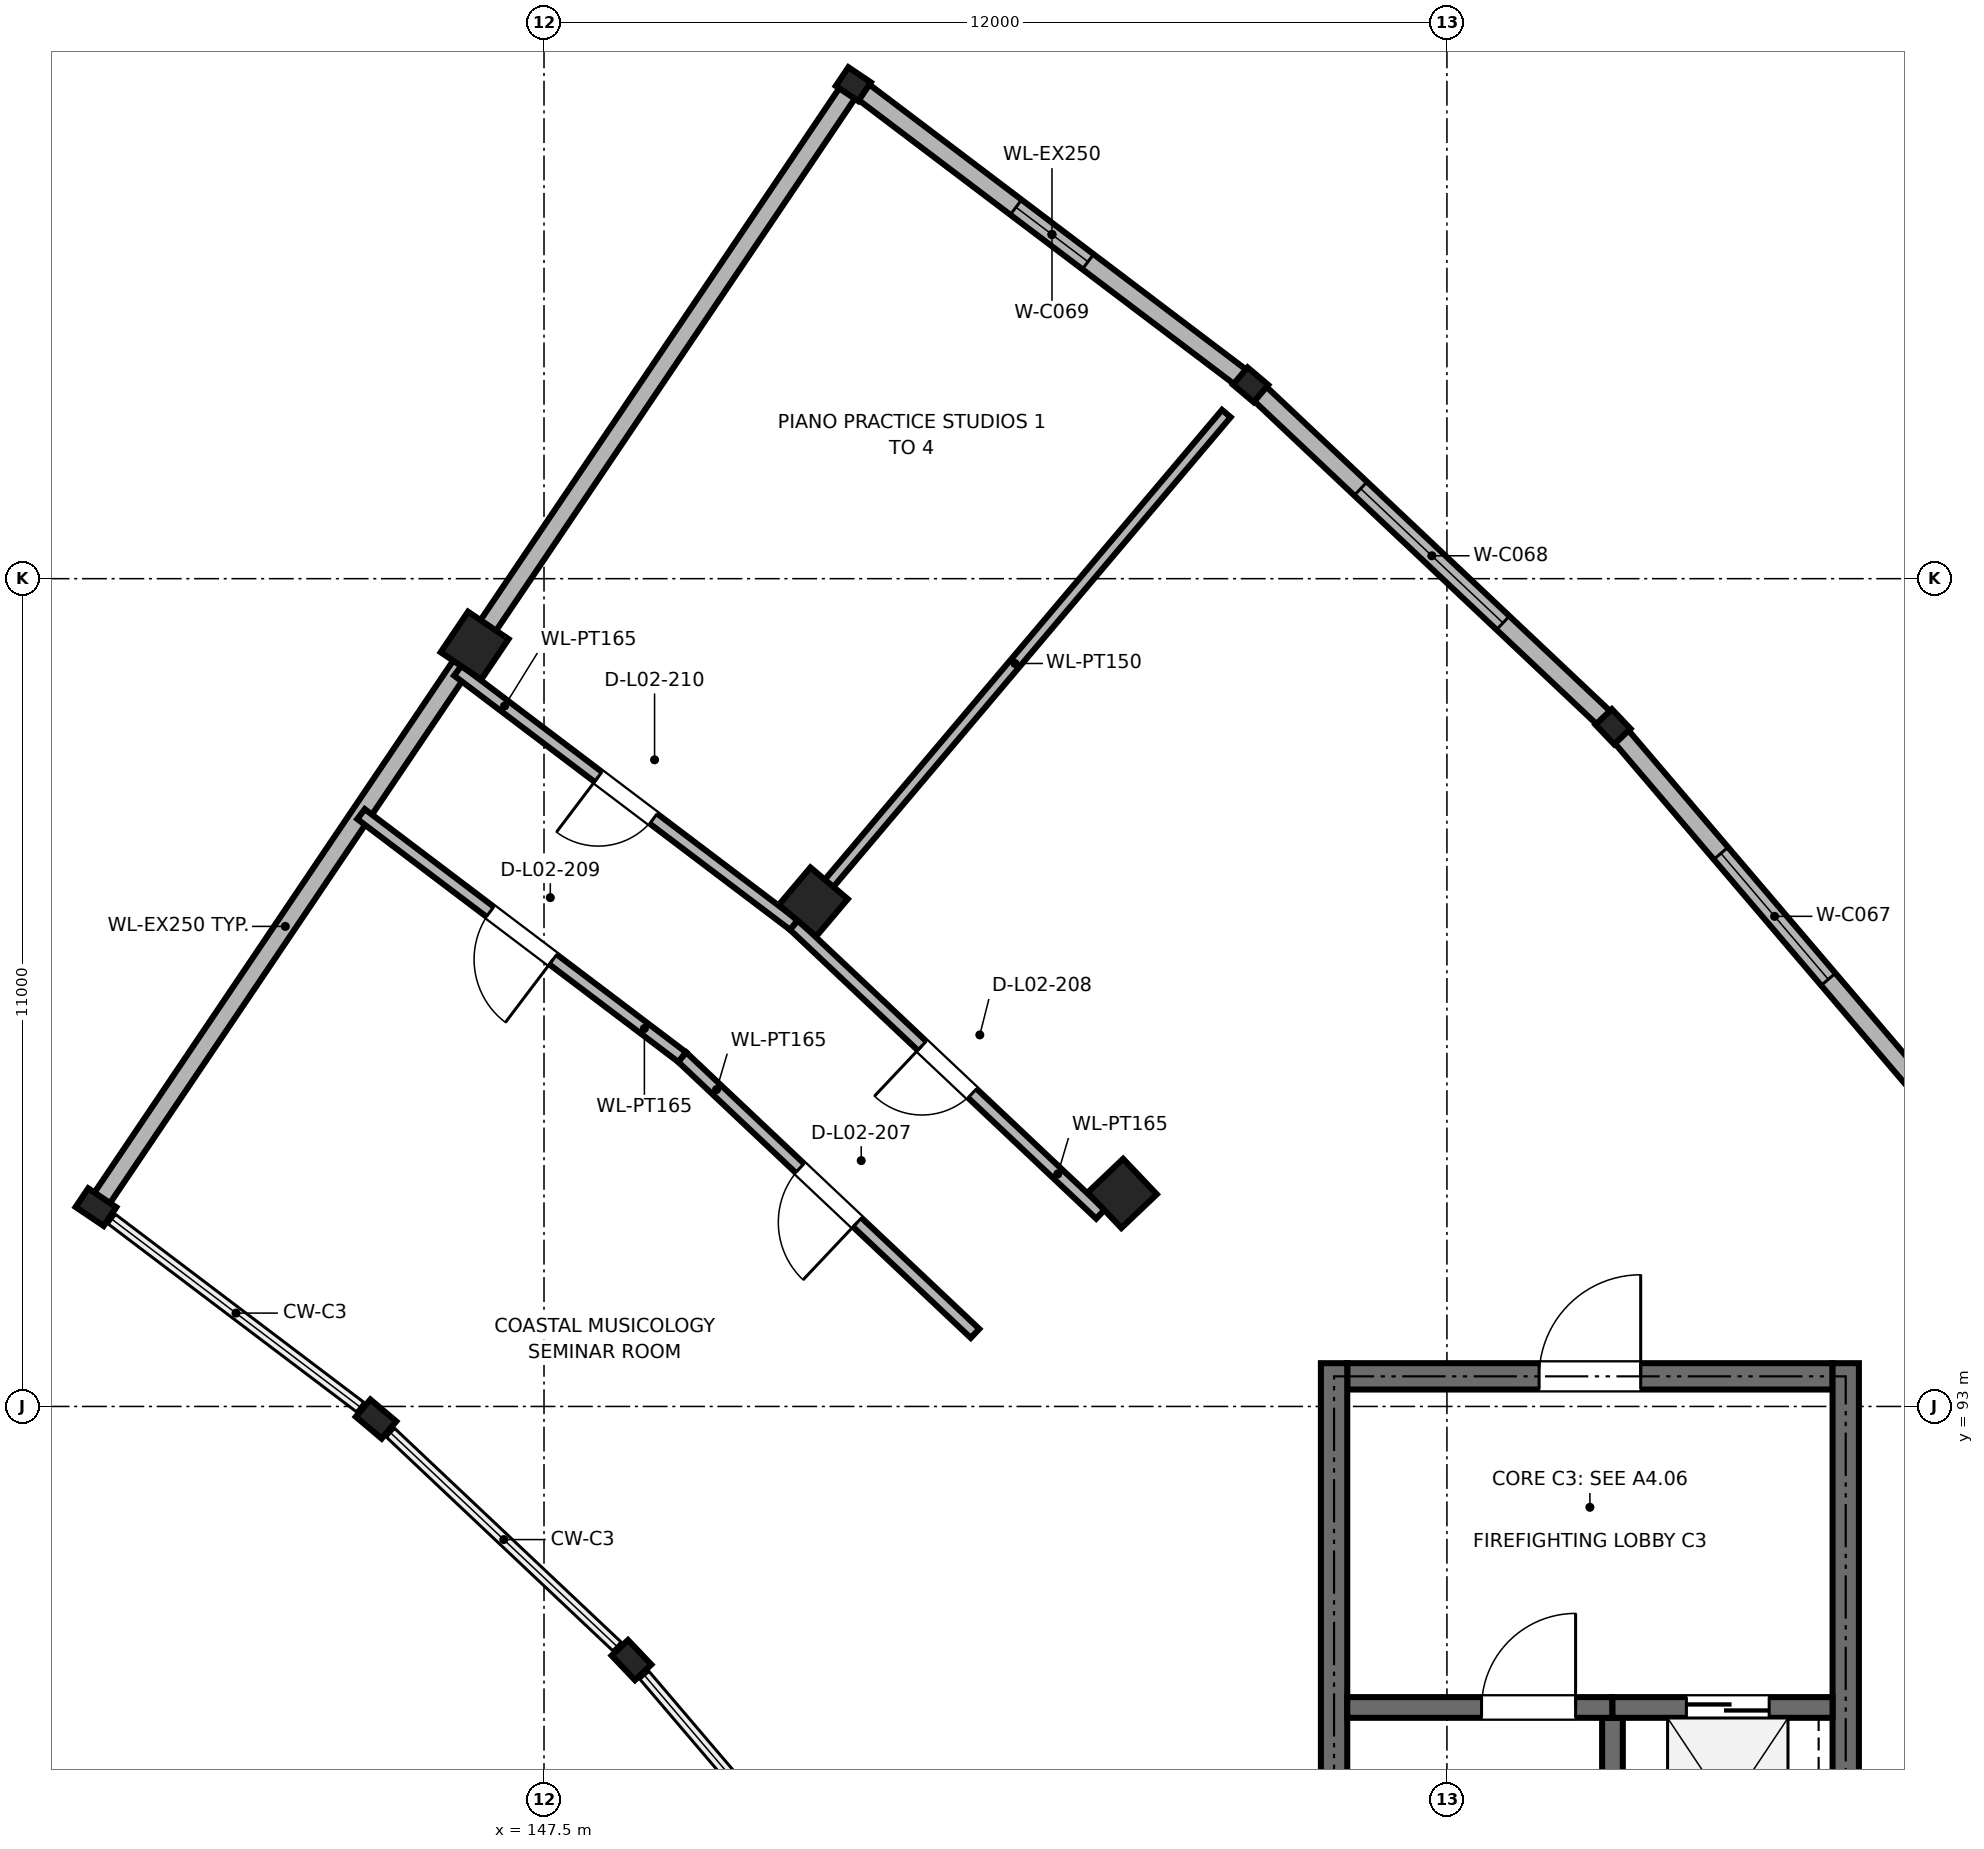
"""IFC4 building model, lengths in metres.
Left out: names, types, materials, properties, quantities, classifications, styles, units other than length and angle.
Written with IfcOpenShell. Run it as: python <this file> out.ifc"""

import sys

from ifc_helpers import new_model, si_unit, direction, frame, frame_2d, origin, origin_2d, place, context, subcontext, project, spatial, rectangle, i_section, extrude, element, fill, save


model = new_model("IFC4")
c1 = context("Model", 3, precision=1e-05, world=origin(), true_north=direction((0.0, 1.0)))
c2 = subcontext(c1, "Body", "Model", "MODEL_VIEW")
j1 = project(units=[si_unit("LENGTHUNIT", "METRE"), si_unit("PLANEANGLEUNIT", "RADIAN")], contexts=[c1])
p1 = place(None, origin())
s1 = spatial("IfcSite", under=j1, at=p1, CompositionType="ELEMENT")
p2 = place(p1, origin())
s2 = spatial("IfcBuilding", under=s1, at=p2, CompositionType="ELEMENT")
p3 = place(p2, frame((0.0, 0.0, 9.6)))
s3 = spatial("IfcBuildingStorey", under=s2, at=p3, CompositionType="ELEMENT", Elevation=9.6)
p4 = place(p3, frame((148.662, 89.629, 0.0), z_axis=(0.0, 0.0, 1.0), x_axis=(0.724653130187, 0.689113808387, 0.0)))
e1 = element("IfcColumn", 1, at=p4, inside=s3, PredefinedType="COLUMN", context=c2, shape_type="SweptSolid", body=[
    extrude(i_section(OverallWidth=0.3, OverallDepth=0.45, WebThickness=0.014, FlangeThickness=0.026, FilletRadius=0.027, at=origin_2d()), origin(), (0.0, 0.0, 1.0), 4.8),
])
p5 = place(p3, frame((155.185, 95.831, 0.0), z_axis=(0.0, 0.0, 1.0), x_axis=(0.724653130187, 0.689113808387, 0.0)))
e2 = element("IfcColumn", 2, at=p5, inside=s3, PredefinedType="COLUMN", context=c2, shape_type="SweptSolid", body=[
    extrude(rectangle(XDim=0.65, YDim=0.65, at=origin_2d()), origin(), (0.0, 0.0, 1.0), 4.8),
])
p6 = place(p3, frame((161.707, 102.032, 0.0), z_axis=(0.0, 0.0, 1.0), x_axis=(0.724653130187, 0.689113808387, 0.0)))
e3 = element("IfcColumn", 3, at=p6, inside=s3, PredefinedType="COLUMN", context=c2, shape_type="SweptSolid", body=[
    extrude(i_section(OverallWidth=0.3, OverallDepth=0.36, WebThickness=0.012, FlangeThickness=0.022, FilletRadius=0.027, at=origin_2d()), origin(), (0.0, 0.0, 1.0), 4.8),
])
p7 = place(p3, frame((145.267, 92.833, 0.0), z_axis=(0.0, 0.0, 1.0), x_axis=(0.645724263505, 0.763570674869, 0.0)))
e4 = element("IfcColumn", 4, at=p7, inside=s3, PredefinedType="COLUMN", context=c2, shape_type="SweptSolid", body=[
    extrude(i_section(OverallWidth=0.3, OverallDepth=0.45, WebThickness=0.014, FlangeThickness=0.026, FilletRadius=0.027, at=origin_2d()), origin(), (0.0, 0.0, 1.0), 4.8),
])
p8 = place(p3, frame((151.079, 99.704, 0.0), z_axis=(0.0, 0.0, 1.0), x_axis=(0.645724263505, 0.763570674869, 0.0)))
e5 = element("IfcColumn", 5, at=p8, inside=s3, PredefinedType="COLUMN", context=c2, shape_type="SweptSolid", body=[
    extrude(rectangle(XDim=0.65, YDim=0.65, at=origin_2d()), origin(), (0.0, 0.0, 1.0), 4.8),
])
p9 = place(p3, frame((156.891, 106.576, 0.0), z_axis=(0.0, 0.0, 1.0), x_axis=(0.645724263505, 0.763570674869, 0.0)))
e6 = element("IfcColumn", 6, at=p9, inside=s3, PredefinedType="COLUMN", context=c2, shape_type="SweptSolid", body=[
    extrude(i_section(OverallWidth=0.3, OverallDepth=0.36, WebThickness=0.012, FlangeThickness=0.022, FilletRadius=0.027, at=origin_2d()), origin(), (0.0, 0.0, 1.0), 4.8),
])
p10 = place(p3, frame((141.545, 95.649, 0.0), z_axis=(0.0, 0.0, 1.0), x_axis=(0.559192903471, 0.829037572555, 0.0)))
e7 = element("IfcColumn", 7, at=p10, inside=s3, PredefinedType="COLUMN", context=c2, shape_type="SweptSolid", body=[
    extrude(i_section(OverallWidth=0.3, OverallDepth=0.45, WebThickness=0.014, FlangeThickness=0.026, FilletRadius=0.027, at=origin_2d()), origin(), (0.0, 0.0, 1.0), 4.8),
])
p11 = place(p3, frame((146.578, 103.11, 0.0), z_axis=(0.0, 0.0, 1.0), x_axis=(0.559192903471, 0.829037572555, 0.0)))
e8 = element("IfcColumn", 8, at=p11, inside=s3, PredefinedType="COLUMN", context=c2, shape_type="SweptSolid", body=[
    extrude(rectangle(XDim=0.65, YDim=0.65, at=origin_2d()), origin(), (0.0, 0.0, 1.0), 4.8),
])
p12 = place(p3, frame((151.611, 110.571, 0.0), z_axis=(0.0, 0.0, 1.0), x_axis=(0.559192903471, 0.829037572555, 0.0)))
e9 = element("IfcColumn", 9, at=p12, inside=s3, PredefinedType="COLUMN", context=c2, shape_type="SweptSolid", body=[
    extrude(i_section(OverallWidth=0.3, OverallDepth=0.36, WebThickness=0.012, FlangeThickness=0.022, FilletRadius=0.027, at=origin_2d()), origin(), (0.0, 0.0, 1.0), 4.8),
])
p13 = place(p3, frame((161.72, 102.017, 0.0), z_axis=(0.0, 0.0, 1.0), x_axis=(0.648708464949, -0.761037007973, 0.0)))
e10 = element("IfcWall", 10, at=p13, inside=s3, PredefinedType="SOLIDWALL", context=c2, shape_type="SweptSolid", body=[
    extrude(rectangle(XDim=6.581, YDim=0.25, at=frame_2d((3.291, 0.0))), origin(), (0.0, 0.0, 1.0), 3.988),
])
p14 = place(p13, frame((2.191, 0.0, 1.5)))
e11 = element("IfcOpeningElement", 11, at=p14, cuts=e10, PredefinedType="OPENING", context=c2, shape_type="SweptSolid", body=[
    extrude(rectangle(XDim=2.2, YDim=1.05, at=frame_2d((1.1, 0.525))), frame((0.0, 0.135, 0.0), z_axis=(0.0, -1.0, 0.0), x_axis=(1.0, 0.0, 0.0)), (0.0, 0.0, 1.0), 0.27),
])
p15 = place(p3, frame((156.906, 106.562, 0.0), z_axis=(0.0, 0.0, 1.0), x_axis=(0.727377231984, -0.686237832235, 0.0)))
e12 = element("IfcWall", 12, at=p15, inside=s3, PredefinedType="SOLIDWALL", context=c2, shape_type="SweptSolid", body=[
    extrude(rectangle(XDim=6.581, YDim=0.25, at=frame_2d((3.291, 0.0))), origin(), (0.0, 0.0, 1.0), 3.988),
])
p16 = place(p15, frame((1.991, 0.0, 1.5)))
e13 = element("IfcOpeningElement", 13, at=p16, cuts=e12, PredefinedType="OPENING", context=c2, shape_type="SweptSolid", body=[
    extrude(rectangle(XDim=2.6, YDim=1.05, at=frame_2d((1.3, 0.525))), frame((0.0, 0.135, 0.0), z_axis=(0.0, -1.0, 0.0), x_axis=(1.0, 0.0, 0.0)), (0.0, 0.0, 1.0), 0.27),
])
p17 = place(p3, frame((151.627, 110.559, 0.0), z_axis=(0.0, 0.0, 1.0), x_axis=(0.797477783019, -0.603348311998, 0.0)))
e14 = element("IfcWall", 14, at=p17, inside=s3, PredefinedType="SOLIDWALL", context=c2, shape_type="SweptSolid", body=[
    extrude(rectangle(XDim=6.581, YDim=0.25, at=frame_2d((3.291, 0.0))), origin(), (0.0, 0.0, 1.0), 3.988),
])
p18 = place(p17, frame((2.691, 0.0, 0.9)))
e15 = element("IfcOpeningElement", 15, at=p18, cuts=e14, PredefinedType="OPENING", context=c2, shape_type="SweptSolid", body=[
    extrude(rectangle(XDim=1.2, YDim=1.55, at=frame_2d((0.6, 0.775))), frame((0.0, 0.135, 0.0), z_axis=(0.0, -1.0, 0.0), x_axis=(1.0, 0.0, 0.0)), (0.0, 0.0, 1.0), 0.27),
])
p19 = place(p3, frame((141.556, 95.665, 0.0), z_axis=(0.0, 0.0, 1.0), x_axis=(0.559200466777, 0.829032470991, 0.0)))
e16 = element("IfcWall", 16, at=p19, inside=s3, PredefinedType="SOLIDWALL", context=c2, shape_type="SweptSolid", body=[
    extrude(rectangle(XDim=8.96, YDim=0.25, at=frame_2d((4.48, 0.0))), origin(), (0.0, 0.0, 1.0), 3.988),
])
p20 = place(p3, frame((146.589, 103.127, 0.0), z_axis=(0.0, 0.0, 1.0), x_axis=(0.559213098812, 0.829023950268, 0.0)))
e17 = element("IfcWall", 17, at=p20, inside=s3, PredefinedType="SOLIDWALL", context=c2, shape_type="SweptSolid", body=[
    extrude(rectangle(XDim=8.96, YDim=0.25, at=frame_2d((4.48, 0.0))), origin(), (0.0, 0.0, 1.0), 3.988),
])
p21 = place(p3, frame((158.175, 93.4, 0.0), z_axis=(0.0, 0.0, 1.0), x_axis=(1.0, 0.0, 0.0)))
e18 = element("IfcWall", 18, at=p21, inside=s3, PredefinedType="SHEAR", context=c2, shape_type="SweptSolid", body=[
    extrude(rectangle(XDim=6.45, YDim=0.35, at=frame_2d((3.225, 0.0))), origin(), (0.0, 0.0, 1.0), 4.55),
])
p22 = place(p21, frame((2.55, 0.0, 0.0)))
e19 = element("IfcOpeningElement", 19, at=p22, cuts=e18, PredefinedType="OPENING", context=c2, shape_type="SweptSolid", body=[
    extrude(rectangle(XDim=1.35, YDim=2.2, at=frame_2d((0.675, 1.1))), frame((0.0, 0.185, 0.0), z_axis=(0.0, -1.0, 0.0), x_axis=(1.0, 0.0, 0.0)), (0.0, 0.0, 1.0), 0.37),
])
for number, where, z_axis, x_axis in (
    (20, (158.0, 81.975, 0.0), (0.0, 0.0, 1.0), (0.0, 1.0, 0.0)),
    (21, (164.8, 81.975, 0.0), (0.0, 0.0, 1.0), (0.0, 1.0, 0.0)),
):
    element("IfcWall", number, at=place(p3, frame(where, z_axis=z_axis, x_axis=x_axis)), inside=s3, PredefinedType="SHEAR", context=c2, shape_type="SweptSolid", body=[
        extrude(rectangle(XDim=11.6, YDim=0.35, at=frame_2d((5.8, 0.0))), origin(), (0.0, 0.0, 1.0), 4.55),
    ])
p23 = place(p3, frame((161.7, 81.975, 0.0), z_axis=(0.0, 0.0, 1.0), x_axis=(0.0, 1.0, 0.0)))
e22 = element("IfcWall", 22, at=p23, inside=s3, PredefinedType="SHEAR", context=c2, shape_type="SweptSolid", body=[
    extrude(rectangle(XDim=6.887, YDim=0.275, at=frame_2d((3.444, 0.0))), origin(), (0.0, 0.0, 1.0), 4.55),
])
p24 = place(p3, frame((158.175, 89.0, 0.0), z_axis=(0.0, 0.0, 1.0), x_axis=(1.0, 0.0, 0.0)))
e23 = element("IfcWall", 23, at=p24, inside=s3, PredefinedType="SHEAR", context=c2, shape_type="SweptSolid", body=[
    extrude(rectangle(XDim=3.525, YDim=0.275, at=frame_2d((1.762, 0.0))), origin(), (0.0, 0.0, 1.0), 4.55),
])
p25 = place(p24, frame((1.785, 0.0, 0.0)))
e24 = element("IfcOpeningElement", 24, at=p25, cuts=e23, PredefinedType="OPENING", context=c2, shape_type="SweptSolid", body=[
    extrude(rectangle(XDim=1.25, YDim=2.15, at=frame_2d((0.625, 1.075))), frame((0.0, 0.147, 0.0), z_axis=(0.0, -1.0, 0.0), x_axis=(1.0, 0.0, 0.0)), (0.0, 0.0, 1.0), 0.295),
])
p26 = place(p3, frame((161.7, 89.0, 0.0), z_axis=(0.0, 0.0, 1.0), x_axis=(1.0, 0.0, 0.0)))
e25 = element("IfcWall", 25, at=p26, inside=s3, PredefinedType="SHEAR", context=c2, shape_type="SweptSolid", body=[
    extrude(rectangle(XDim=2.925, YDim=0.275, at=frame_2d((1.462, 0.0))), origin(), (0.0, 0.0, 1.0), 4.55),
])
p27 = place(p26, frame((0.982, 0.0, 0.0)))
e26 = element("IfcOpeningElement", 26, at=p27, cuts=e25, PredefinedType="OPENING", context=c2, shape_type="SweptSolid", body=[
    extrude(rectangle(XDim=1.1, YDim=2.15, at=frame_2d((0.55, 1.075))), frame((0.0, 0.147, 0.0), z_axis=(0.0, -1.0, 0.0), x_axis=(1.0, 0.0, 0.0)), (0.0, 0.0, 1.0), 0.295),
])
p28 = place(p3, frame((153.228, 93.97, 0.0), z_axis=(0.0, 0.0, 1.0), x_axis=(-0.7273609966, 0.68625504051, 0.0)))
e27 = element("IfcWall", 27, at=p28, inside=s3, PredefinedType="PARTITIONING", context=c2, shape_type="SweptSolid", body=[
    extrude(rectangle(XDim=5.351, YDim=0.165, at=frame_2d((2.676, 0.0))), origin(), (0.0, 0.0, 1.0), 3.99),
])
p29 = place(p28, frame((2.151, 0.0, 0.0)))
e28 = element("IfcOpeningElement", 28, at=p29, cuts=e27, PredefinedType="OPENING", context=c2, shape_type="SweptSolid", body=[
    extrude(rectangle(XDim=1.05, YDim=2.15, at=frame_2d((0.525, 1.075))), frame((0.0, 0.093, 0.0), z_axis=(0.0, -1.0, 0.0), x_axis=(1.0, 0.0, 0.0)), (0.0, 0.0, 1.0), 0.185),
])
p30 = place(p3, frame((154.895, 95.555, 0.0), z_axis=(0.0, 0.0, 1.0), x_axis=(-0.727402273239, 0.686211288807, 0.0)))
e29 = element("IfcWall", 29, at=p30, inside=s3, PredefinedType="PARTITIONING", context=c2, shape_type="SweptSolid", body=[
    extrude(rectangle(XDim=5.601, YDim=0.165, at=frame_2d((2.801, 0.0))), origin(), (0.0, 0.0, 1.0), 3.99),
])
p31 = place(p30, frame((2.341, 0.0, 0.0)))
e30 = element("IfcOpeningElement", 30, at=p31, cuts=e29, PredefinedType="OPENING", context=c2, shape_type="SweptSolid", body=[
    extrude(rectangle(XDim=0.92, YDim=2.1, at=frame_2d((0.46, 1.05))), frame((0.0, 0.093, 0.0), z_axis=(0.0, -1.0, 0.0), x_axis=(1.0, 0.0, 0.0)), (0.0, 0.0, 1.0), 0.185),
])
p32 = place(p3, frame((149.336, 97.643, 0.0), z_axis=(0.0, 0.0, 1.0), x_axis=(-0.797474612376, 0.603352502784, 0.0)))
e31 = element("IfcWall", 31, at=p32, inside=s3, PredefinedType="PARTITIONING", context=c2, shape_type="SweptSolid", body=[
    extrude(rectangle(XDim=5.351, YDim=0.165, at=frame_2d((2.676, 0.0))), origin(), (0.0, 0.0, 1.0), 3.99),
])
p33 = place(p32, frame((2.151, 0.0, 0.0)))
e32 = element("IfcOpeningElement", 32, at=p33, cuts=e31, PredefinedType="OPENING", context=c2, shape_type="SweptSolid", body=[
    extrude(rectangle(XDim=1.05, YDim=2.15, at=frame_2d((0.525, 1.075))), frame((0.0, 0.093, 0.0), z_axis=(0.0, -1.0, 0.0), x_axis=(1.0, 0.0, 0.0)), (0.0, 0.0, 1.0), 0.185),
])
p34 = place(p3, frame((150.821, 99.399, 0.0), z_axis=(0.0, 0.0, 1.0), x_axis=(-0.797450601932, 0.603384237015, 0.0)))
e33 = element("IfcWall", 33, at=p34, inside=s3, PredefinedType="PARTITIONING", context=c2, shape_type="SweptSolid", body=[
    extrude(rectangle(XDim=5.601, YDim=0.165, at=frame_2d((2.8, 0.0))), origin(), (0.0, 0.0, 1.0), 3.99),
])
p35 = place(p34, frame((2.34, 0.0, 0.0)))
e34 = element("IfcOpeningElement", 34, at=p35, cuts=e33, PredefinedType="OPENING", context=c2, shape_type="SweptSolid", body=[
    extrude(rectangle(XDim=0.92, YDim=2.1, at=frame_2d((0.46, 1.05))), frame((0.0, 0.093, 0.0), z_axis=(0.0, -1.0, 0.0), x_axis=(1.0, 0.0, 0.0)), (0.0, 0.0, 1.0), 0.185),
])
p36 = place(p3, frame((150.95, 99.552, 0.0), z_axis=(0.0, 0.0, 1.0), x_axis=(0.645745976221, 0.763552312677, 0.0)))
e35 = element("IfcWall", 35, at=p36, inside=s3, PredefinedType="PARTITIONING", context=c2, shape_type="SweptSolid", body=[
    extrude(rectangle(XDim=8.7, YDim=0.15, at=frame_2d((4.35, 0.0))), origin(), (0.0, 0.0, 1.0), 3.99),
])
p37 = place(p14, origin())
e36 = element("IfcWindow", 36, at=p37, inside=s3, PartitioningType="SINGLE_PANEL", PredefinedType="WINDOW", context=c2, shape_type="SweptSolid", body=[
    extrude(rectangle(XDim=2.2, YDim=1.05, at=frame_2d((1.1, 0.525))), frame((0.0, 0.03, 0.0), z_axis=(0.0, -1.0, 0.0), x_axis=(1.0, 0.0, 0.0)), (0.0, 0.0, 1.0), 0.06),
])
fill(e11, e36)
p38 = place(p16, origin())
e37 = element("IfcWindow", 37, at=p38, inside=s3, PartitioningType="SINGLE_PANEL", PredefinedType="WINDOW", context=c2, shape_type="SweptSolid", body=[
    extrude(rectangle(XDim=2.6, YDim=1.05, at=frame_2d((1.3, 0.525))), frame((0.0, 0.03, 0.0), z_axis=(0.0, -1.0, 0.0), x_axis=(1.0, 0.0, 0.0)), (0.0, 0.0, 1.0), 0.06),
])
fill(e13, e37)
p39 = place(p18, origin())
e38 = element("IfcWindow", 38, at=p39, inside=s3, PartitioningType="SINGLE_PANEL", PredefinedType="WINDOW", context=c2, shape_type="SweptSolid", body=[
    extrude(rectangle(XDim=1.2, YDim=1.55, at=frame_2d((0.6, 0.775))), frame((0.0, 0.03, 0.0), z_axis=(0.0, -1.0, 0.0), x_axis=(1.0, 0.0, 0.0)), (0.0, 0.0, 1.0), 0.06),
])
fill(e15, e38)
p40 = place(p25, origin())
e39 = element("IfcDoor", 39, at=p40, inside=s3, OperationType="SINGLE_SWING_RIGHT", PredefinedType="DOOR", context=c2, shape_type="SweptSolid", body=[
    extrude(rectangle(XDim=1.25, YDim=2.15, at=frame_2d((0.625, 1.075))), frame((0.0, 0.025, 0.0), z_axis=(0.0, -1.0, 0.0), x_axis=(1.0, 0.0, 0.0)), (0.0, 0.0, 1.0), 0.05),
])
fill(e24, e39)
p41 = place(p27, origin())
e40 = element("IfcDoor", 40, at=p41, inside=s3, OperationType="DOUBLE_DOOR_SLIDING", PredefinedType="DOOR", context=c2, shape_type="SweptSolid", body=[
    extrude(rectangle(XDim=1.1, YDim=2.15, at=frame_2d((0.55, 1.075))), frame((0.0, 0.025, 0.0), z_axis=(0.0, -1.0, 0.0), x_axis=(1.0, 0.0, 0.0)), (0.0, 0.0, 1.0), 0.05),
])
fill(e26, e40)
p42 = place(p22, origin())
e41 = element("IfcDoor", 41, at=p42, inside=s3, OperationType="SINGLE_SWING_RIGHT", PredefinedType="DOOR", context=c2, shape_type="SweptSolid", body=[
    extrude(rectangle(XDim=1.35, YDim=2.2, at=frame_2d((0.675, 1.1))), frame((0.0, 0.025, 0.0), z_axis=(0.0, -1.0, 0.0), x_axis=(1.0, 0.0, 0.0)), (0.0, 0.0, 1.0), 0.05),
])
fill(e19, e41)
p43 = place(p29, origin())
e42 = element("IfcDoor", 42, at=p43, inside=s3, OperationType="SINGLE_SWING_LEFT", PredefinedType="DOOR", context=c2, shape_type="SweptSolid", body=[
    extrude(rectangle(XDim=1.05, YDim=2.15, at=frame_2d((0.525, 1.075))), frame((0.0, 0.025, 0.0), z_axis=(0.0, -1.0, 0.0), x_axis=(1.0, 0.0, 0.0)), (0.0, 0.0, 1.0), 0.05),
])
fill(e28, e42)
p44 = place(p31, origin())
e43 = element("IfcDoor", 43, at=p44, inside=s3, OperationType="SINGLE_SWING_RIGHT", PredefinedType="DOOR", context=c2, shape_type="SweptSolid", body=[
    extrude(rectangle(XDim=0.92, YDim=2.1, at=frame_2d((0.46, 1.05))), frame((0.0, 0.025, 0.0), z_axis=(0.0, -1.0, 0.0), x_axis=(1.0, 0.0, 0.0)), (0.0, 0.0, 1.0), 0.05),
])
fill(e30, e43)
p45 = place(p33, origin())
e44 = element("IfcDoor", 44, at=p45, inside=s3, OperationType="SINGLE_SWING_LEFT", PredefinedType="DOOR", context=c2, shape_type="SweptSolid", body=[
    extrude(rectangle(XDim=1.05, YDim=2.15, at=frame_2d((0.525, 1.075))), frame((0.0, 0.025, 0.0), z_axis=(0.0, -1.0, 0.0), x_axis=(1.0, 0.0, 0.0)), (0.0, 0.0, 1.0), 0.05),
])
fill(e32, e44)
p46 = place(p35, origin())
e45 = element("IfcDoor", 45, at=p46, inside=s3, OperationType="SINGLE_SWING_RIGHT", PredefinedType="DOOR", context=c2, shape_type="SweptSolid", body=[
    extrude(rectangle(XDim=0.92, YDim=2.1, at=frame_2d((0.46, 1.05))), frame((0.0, 0.025, 0.0), z_axis=(0.0, -1.0, 0.0), x_axis=(1.0, 0.0, 0.0)), (0.0, 0.0, 1.0), 0.05),
])
fill(e34, e45)
save(model, sys.argv[1])
